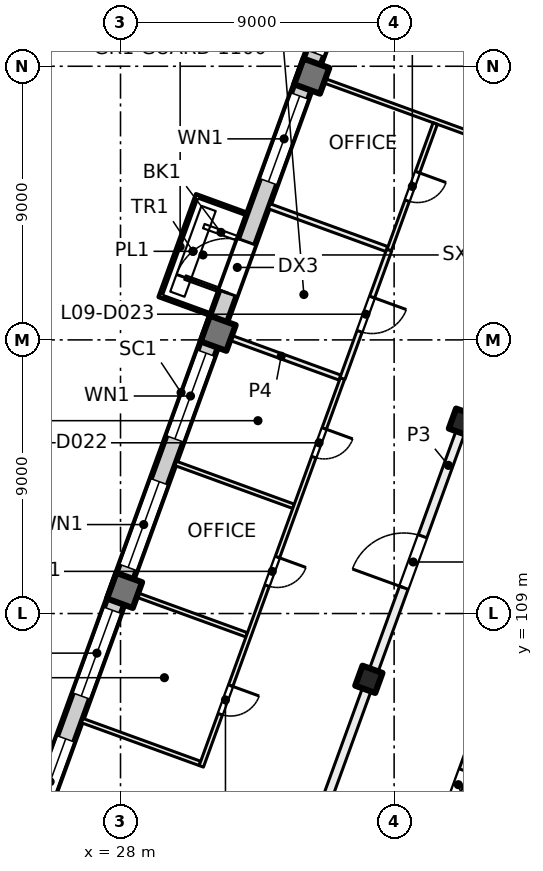
"""IFC4 building model, lengths in metres.
Left out: names, types, materials, properties, quantities, classifications, styles, units other than length and angle.
Written with IfcOpenShell. Run it as: python <this file> out.ifc"""

import sys

from ifc_helpers import new_model, si_unit, direction, frame, frame_2d, origin, origin_2d, place, context, subcontext, project, spatial, rectangle, extrude, element, fill, save


model = new_model("IFC4")
c1 = context("Model", 3, precision=1e-05, world=origin(), true_north=direction((0.0, 1.0)))
c2 = subcontext(c1, "Body", "Model", "MODEL_VIEW")
j1 = project(units=[si_unit("LENGTHUNIT", "METRE"), si_unit("PLANEANGLEUNIT", "RADIAN")], contexts=[c1])
p1 = place(None, origin())
s1 = spatial("IfcSite", under=j1, at=p1, CompositionType="ELEMENT")
p2 = place(p1, origin())
s2 = spatial("IfcBuilding", under=s1, at=p2, CompositionType="ELEMENT")
p3 = place(p2, frame((0.0, 0.0, 43.5)))
s3 = spatial("IfcBuildingStorey", under=s2, at=p3, CompositionType="ELEMENT", Elevation=43.5)
for number, where, z_axis, x_axis in (
    (1, (39.247, 115.293, 0.0), (0.0, 0.0, 1.0), (-0.342, -0.94, 0.0)),
    (2, (36.169, 106.836, 0.0), (0.0, 0.0, 1.0), (-0.342, -0.94, 0.0)),
):
    element("IfcColumn", number, at=place(p3, frame(where, z_axis=z_axis, x_axis=x_axis)), inside=s3, PredefinedType="COLUMN", context=c2, shape_type="SweptSolid", body=[
        extrude(rectangle(XDim=0.7, YDim=0.7, at=origin_2d()), origin(), (0.0, 0.0, 1.0), 4.0),
    ])
for number, where, z_axis, x_axis in (
    (3, (34.291, 126.675, 0.0), (0.0, 0.0, 1.0), (-0.342, -0.94, 0.0)),
    (4, (31.212, 118.218, 0.0), (0.0, 0.0, 1.0), (-0.342, -0.94, 0.0)),
    (5, (28.134, 109.76, 0.0), (0.0, 0.0, 1.0), (-0.342, -0.94, 0.0)),
):
    element("IfcColumn", number, at=place(p3, frame(where, z_axis=z_axis, x_axis=x_axis)), inside=s3, PredefinedType="COLUMN", context=c2, shape_type="SweptSolid", body=[
        extrude(rectangle(XDim=0.9, YDim=0.9, at=origin_2d()), origin(), (0.0, 0.0, 1.0), 4.0),
    ])
p4 = place(p3, frame((24.666, 100.669, 0.0), z_axis=(0.0, 0.0, 1.0), x_axis=(0.34201964167, 0.939692803373, 0.0)))
e6 = element("IfcWall", 6, at=p4, inside=s3, PredefinedType="SOLIDWALL", context=c2, shape_type="SweptSolid", body=[
    extrude(rectangle(XDim=32.884, YDim=0.6, at=frame_2d((16.442, 0.0))), origin(), (0.0, 0.0, 1.0), 3.625),
])
p5 = place(p4, frame((1.48, 0.0, 0.9)))
e7 = element("IfcOpeningElement", 7, at=p5, cuts=e6, PredefinedType="OPENING", context=c2, shape_type="SweptSolid", body=[
    extrude(rectangle(XDim=3.0, YDim=2.4, at=frame_2d((1.5, 1.2))), frame((0.0, 0.31, 0.0), z_axis=(0.0, -1.0, 0.0), x_axis=(1.0, 0.0, 0.0)), (0.0, 0.0, 1.0), 0.62),
])
p6 = place(p4, frame((5.98, 0.0, 0.9)))
e8 = element("IfcOpeningElement", 8, at=p6, cuts=e6, PredefinedType="OPENING", context=c2, shape_type="SweptSolid", body=[
    extrude(rectangle(XDim=3.0, YDim=2.4, at=frame_2d((1.5, 1.2))), frame((0.0, 0.31, 0.0), z_axis=(0.0, -1.0, 0.0), x_axis=(1.0, 0.0, 0.0)), (0.0, 0.0, 1.0), 0.62),
])
p7 = place(p4, frame((10.48, 0.0, 0.9)))
e9 = element("IfcOpeningElement", 9, at=p7, cuts=e6, PredefinedType="OPENING", context=c2, shape_type="SweptSolid", body=[
    extrude(rectangle(XDim=3.0, YDim=2.4, at=frame_2d((1.5, 1.2))), frame((0.0, 0.31, 0.0), z_axis=(0.0, -1.0, 0.0), x_axis=(1.0, 0.0, 0.0)), (0.0, 0.0, 1.0), 0.62),
])
p8 = place(p4, frame((14.98, 0.0, 0.9)))
e10 = element("IfcOpeningElement", 10, at=p8, cuts=e6, PredefinedType="OPENING", context=c2, shape_type="SweptSolid", body=[
    extrude(rectangle(XDim=3.0, YDim=2.4, at=frame_2d((1.5, 1.2))), frame((0.0, 0.31, 0.0), z_axis=(0.0, -1.0, 0.0), x_axis=(1.0, 0.0, 0.0)), (0.0, 0.0, 1.0), 0.62),
])
p9 = place(p4, frame((20.08, 0.0, 0.0)))
e11 = element("IfcOpeningElement", 11, at=p9, cuts=e6, PredefinedType="OPENING", context=c2, shape_type="SweptSolid", body=[
    extrude(rectangle(XDim=1.8, YDim=2.4, at=frame_2d((0.9, 1.2))), frame((0.0, 0.31, 0.0), z_axis=(0.0, -1.0, 0.0), x_axis=(1.0, 0.0, 0.0)), (0.0, 0.0, 1.0), 0.62),
])
p10 = place(p4, frame((23.98, 0.0, 0.9)))
e12 = element("IfcOpeningElement", 12, at=p10, cuts=e6, PredefinedType="OPENING", context=c2, shape_type="SweptSolid", body=[
    extrude(rectangle(XDim=3.0, YDim=2.4, at=frame_2d((1.5, 1.2))), frame((0.0, 0.31, 0.0), z_axis=(0.0, -1.0, 0.0), x_axis=(1.0, 0.0, 0.0)), (0.0, 0.0, 1.0), 0.62),
])
p11 = place(p4, frame((28.48, 0.0, 0.9)))
e13 = element("IfcOpeningElement", 13, at=p11, cuts=e6, PredefinedType="OPENING", context=c2, shape_type="SweptSolid", body=[
    extrude(rectangle(XDim=3.0, YDim=2.4, at=frame_2d((1.5, 1.2))), frame((0.0, 0.31, 0.0), z_axis=(0.0, -1.0, 0.0), x_axis=(1.0, 0.0, 0.0)), (0.0, 0.0, 1.0), 0.62),
])
p12 = place(p3, frame((26.736, 105.48, 0.0), z_axis=(0.0, 0.0, 1.0), x_axis=(0.939784783713, -0.341766821533, 0.0)))
e14 = element("IfcWall", 14, at=p12, inside=s3, PredefinedType="PARTITIONING", context=c2, shape_type="SweptSolid", body=[
    extrude(rectangle(XDim=4.125, YDim=0.15, at=frame_2d((2.062, 0.0))), origin(), (0.0, 0.0, 1.0), 3.625),
])
p13 = place(p3, frame((28.275, 109.709, 0.0), z_axis=(0.0, 0.0, 1.0), x_axis=(0.939791695678, -0.341747814529, 0.0)))
e15 = element("IfcWall", 15, at=p13, inside=s3, PredefinedType="PARTITIONING", context=c2, shape_type="SweptSolid", body=[
    extrude(rectangle(XDim=4.125, YDim=0.15, at=frame_2d((2.063, 0.0))), origin(), (0.0, 0.0, 1.0), 3.625),
])
p14 = place(p3, frame((29.814, 113.938, 0.0), z_axis=(0.0, 0.0, 1.0), x_axis=(0.93970873465, -0.341975867603, 0.0)))
e16 = element("IfcWall", 16, at=p14, inside=s3, PredefinedType="PARTITIONING", context=c2, shape_type="SweptSolid", body=[
    extrude(rectangle(XDim=4.126, YDim=0.15, at=frame_2d((2.063, 0.0))), origin(), (0.0, 0.0, 1.0), 3.625),
])
p15 = place(p3, frame((35.3, 116.73, 0.0), z_axis=(0.0, 0.0, 1.0), x_axis=(-0.342040522051, -0.939685203286, 0.0)))
e17 = element("IfcWall", 17, at=p15, inside=s3, PredefinedType="PARTITIONING", context=c2, shape_type="SweptSolid", body=[
    extrude(rectangle(XDim=13.575, YDim=0.15, at=frame_2d((6.787, 0.0))), origin(), (0.0, 0.0, 1.0), 3.625),
])
p16 = place(p15, frame((10.75, 0.0, 0.0)))
e18 = element("IfcOpeningElement", 18, at=p16, cuts=e17, PredefinedType="OPENING", context=c2, shape_type="SweptSolid", body=[
    extrude(rectangle(XDim=1.0, YDim=2.1, at=frame_2d((0.5, 1.05))), frame((0.0, 0.085, 0.0), z_axis=(0.0, -1.0, 0.0), x_axis=(1.0, 0.0, 0.0)), (0.0, 0.0, 1.0), 0.17),
])
p17 = place(p15, frame((6.25, 0.0, 0.0)))
e19 = element("IfcOpeningElement", 19, at=p17, cuts=e17, PredefinedType="OPENING", context=c2, shape_type="SweptSolid", body=[
    extrude(rectangle(XDim=1.0, YDim=2.1, at=frame_2d((0.5, 1.05))), frame((0.0, 0.085, 0.0), z_axis=(0.0, -1.0, 0.0), x_axis=(1.0, 0.0, 0.0)), (0.0, 0.0, 1.0), 0.17),
])
p18 = place(p15, frame((1.75, 0.0, 0.0)))
e20 = element("IfcOpeningElement", 20, at=p18, cuts=e17, PredefinedType="OPENING", context=c2, shape_type="SweptSolid", body=[
    extrude(rectangle(XDim=1.0, YDim=2.1, at=frame_2d((0.5, 1.05))), frame((0.0, 0.085, 0.0), z_axis=(0.0, -1.0, 0.0), x_axis=(1.0, 0.0, 0.0)), (0.0, 0.0, 1.0), 0.17),
])
p19 = place(p3, frame((31.353, 118.166, 0.0), z_axis=(0.0, 0.0, 1.0), x_axis=(0.939750086456, -0.341862216405, 0.0)))
e21 = element("IfcWall", 21, at=p19, inside=s3, PredefinedType="PARTITIONING", context=c2, shape_type="SweptSolid", body=[
    extrude(rectangle(XDim=4.113, YDim=0.175, at=frame_2d((2.056, 0.0))), origin(), (0.0, 0.0, 1.0), 3.625),
])
p20 = place(p3, frame((32.881, 97.657, 0.0), z_axis=(0.0, 0.0, 1.0), x_axis=(0.342017360004, 0.939693633828, 0.0)))
e22 = element("IfcWall", 22, at=p20, inside=s3, PredefinedType="PARTITIONING", context=c2, shape_type="SweptSolid", body=[
    extrude(rectangle(XDim=34.516, YDim=0.3, at=frame_2d((17.258, 0.0))), origin(), (0.0, 0.0, 1.0), 3.625),
])
p21 = place(p20, frame((12.975, 0.0, 0.0)))
e23 = element("IfcOpeningElement", 23, at=p21, cuts=e22, PredefinedType="OPENING", context=c2, shape_type="SweptSolid", body=[
    extrude(rectangle(XDim=1.8, YDim=2.1, at=frame_2d((0.9, 1.05))), frame((0.0, 0.16, 0.0), z_axis=(0.0, -1.0, 0.0), x_axis=(1.0, 0.0, 0.0)), (0.0, 0.0, 1.0), 0.32),
])
p22 = place(p3, frame((34.431, 126.624, 0.0), z_axis=(0.0, 0.0, 1.0), x_axis=(0.939687752599, -0.342033518263, 0.0)))
e24 = element("IfcWall", 24, at=p22, inside=s3, PredefinedType="PARTITIONING", context=c2, shape_type="SweptSolid", body=[
    extrude(rectangle(XDim=8.301, YDim=0.15, at=frame_2d((4.15, 0.0))), origin(), (0.0, 0.0, 1.0), 3.625),
])
p23 = place(p3, frame((36.839, 120.959, 0.0), z_axis=(0.0, 0.0, 1.0), x_axis=(-0.341986974999, -0.939704692407, 0.0)))
e25 = element("IfcWall", 25, at=p23, inside=s3, PredefinedType="PARTITIONING", context=c2, shape_type="SweptSolid", body=[
    extrude(rectangle(XDim=4.5, YDim=0.175, at=frame_2d((2.25, 0.0))), origin(), (0.0, 0.0, 1.0), 3.625),
])
p24 = place(p23, frame((1.65, 0.0, 0.0)))
e26 = element("IfcOpeningElement", 26, at=p24, cuts=e25, PredefinedType="OPENING", context=c2, shape_type="SweptSolid", body=[
    extrude(rectangle(XDim=1.2, YDim=2.1, at=frame_2d((0.6, 1.05))), frame((0.0, 0.097, 0.0), z_axis=(0.0, -1.0, 0.0), x_axis=(1.0, 0.0, 0.0)), (0.0, 0.0, 1.0), 0.195),
])
p25 = place(p3, frame((36.757, 120.989, 0.0), z_axis=(0.0, 0.0, 1.0), x_axis=(-0.939750086456, 0.341862216405, 0.0)))
e27 = element("IfcWall", 27, at=p25, inside=s3, PredefinedType="PARTITIONING", context=c2, shape_type="SweptSolid", body=[
    extrude(rectangle(XDim=4.113, YDim=0.175, at=frame_2d((2.056, 0.0))), origin(), (0.0, 0.0, 1.0), 3.625),
])
p26 = place(p3, frame((38.352, 125.117, 0.0), z_axis=(0.0, 0.0, 1.0), x_axis=(-0.34193355862, -0.939724130524, 0.0)))
e28 = element("IfcWall", 28, at=p26, inside=s3, PredefinedType="PARTITIONING", context=c2, shape_type="SweptSolid", body=[
    extrude(rectangle(XDim=4.425, YDim=0.15, at=frame_2d((2.212, 0.0))), origin(), (0.0, 0.0, 1.0), 3.625),
])
p27 = place(p26, frame((1.702, 0.0, 0.0)))
e29 = element("IfcOpeningElement", 29, at=p27, cuts=e28, PredefinedType="OPENING", context=c2, shape_type="SweptSolid", body=[
    extrude(rectangle(XDim=1.0, YDim=2.1, at=frame_2d((0.5, 1.05))), frame((0.0, 0.085, 0.0), z_axis=(0.0, -1.0, 0.0), x_axis=(1.0, 0.0, 0.0)), (0.0, 0.0, 1.0), 0.17),
])
p28 = place(p3, frame((47.314, 125.909, 0.0), z_axis=(0.0, 0.0, 1.0), x_axis=(-0.342010770371, -0.939696032209, 0.0)))
e30 = element("IfcWall", 30, at=p28, inside=s3, PredefinedType="PARTITIONING", context=c2, shape_type="SweptSolid", body=[
    extrude(rectangle(XDim=31.485, YDim=0.3, at=frame_2d((15.742, 0.0))), origin(), (0.0, 0.0, 1.0), 3.625),
])
p29 = place(p28, frame((28.259, 0.0, 0.0)))
e31 = element("IfcOpeningElement", 31, at=p29, cuts=e30, PredefinedType="OPENING", context=c2, shape_type="SweptSolid", body=[
    extrude(rectangle(XDim=1.2, YDim=2.1, at=frame_2d((0.6, 1.05))), frame((0.0, 0.16, 0.0), z_axis=(0.0, -1.0, 0.0), x_axis=(1.0, 0.0, 0.0)), (0.0, 0.0, 1.0), 0.32),
])
p30 = place(p28, frame((23.484, 0.0, 0.0)))
e32 = element("IfcOpeningElement", 32, at=p30, cuts=e30, PredefinedType="OPENING", context=c2, shape_type="SweptSolid", body=[
    extrude(rectangle(XDim=1.0, YDim=2.1, at=frame_2d((0.5, 1.05))), frame((0.0, 0.16, 0.0), z_axis=(0.0, -1.0, 0.0), x_axis=(1.0, 0.0, 0.0)), (0.0, 0.0, 1.0), 0.32),
])
p31 = place(p28, frame((18.984, 0.0, 0.0)))
e33 = element("IfcOpeningElement", 33, at=p31, cuts=e30, PredefinedType="OPENING", context=c2, shape_type="SweptSolid", body=[
    extrude(rectangle(XDim=1.0, YDim=2.1, at=frame_2d((0.5, 1.05))), frame((0.0, 0.16, 0.0), z_axis=(0.0, -1.0, 0.0), x_axis=(1.0, 0.0, 0.0)), (0.0, 0.0, 1.0), 0.32),
])
p32 = place(p28, frame((14.385, 0.0, 0.0)))
e34 = element("IfcOpeningElement", 34, at=p32, cuts=e30, PredefinedType="OPENING", context=c2, shape_type="SweptSolid", body=[
    extrude(rectangle(XDim=1.2, YDim=2.1, at=frame_2d((0.6, 1.05))), frame((0.0, 0.16, 0.0), z_axis=(0.0, -1.0, 0.0), x_axis=(1.0, 0.0, 0.0)), (0.0, 0.0, 1.0), 0.32),
])
p33 = place(p28, frame((9.885, 0.0, 0.0)))
e35 = element("IfcOpeningElement", 35, at=p33, cuts=e30, PredefinedType="OPENING", context=c2, shape_type="SweptSolid", body=[
    extrude(rectangle(XDim=1.2, YDim=2.1, at=frame_2d((0.6, 1.05))), frame((0.0, 0.16, 0.0), z_axis=(0.0, -1.0, 0.0), x_axis=(1.0, 0.0, 0.0)), (0.0, 0.0, 1.0), 0.32),
])
p34 = place(p28, frame((5.384, 0.0, 0.0)))
e36 = element("IfcOpeningElement", 36, at=p34, cuts=e30, PredefinedType="OPENING", context=c2, shape_type="SweptSolid", body=[
    extrude(rectangle(XDim=1.2, YDim=2.1, at=frame_2d((0.6, 1.05))), frame((0.0, 0.16, 0.0), z_axis=(0.0, -1.0, 0.0), x_axis=(1.0, 0.0, 0.0)), (0.0, 0.0, 1.0), 0.32),
])
p35 = place(p5, origin())
e37 = element("IfcWindow", 37, at=p35, inside=s3, PartitioningType="SINGLE_PANEL", PredefinedType="WINDOW", context=c2, shape_type="SweptSolid", body=[
    extrude(rectangle(XDim=3.0, YDim=2.4, at=frame_2d((1.5, 1.2))), frame((0.0, 0.03, 0.0), z_axis=(0.0, -1.0, 0.0), x_axis=(1.0, 0.0, 0.0)), (0.0, 0.0, 1.0), 0.06),
])
fill(e7, e37)
p36 = place(p6, origin())
e38 = element("IfcWindow", 38, at=p36, inside=s3, PartitioningType="SINGLE_PANEL", PredefinedType="WINDOW", context=c2, shape_type="SweptSolid", body=[
    extrude(rectangle(XDim=3.0, YDim=2.4, at=frame_2d((1.5, 1.2))), frame((0.0, 0.03, 0.0), z_axis=(0.0, -1.0, 0.0), x_axis=(1.0, 0.0, 0.0)), (0.0, 0.0, 1.0), 0.06),
])
fill(e8, e38)
p37 = place(p7, origin())
e39 = element("IfcWindow", 39, at=p37, inside=s3, PartitioningType="SINGLE_PANEL", PredefinedType="WINDOW", context=c2, shape_type="SweptSolid", body=[
    extrude(rectangle(XDim=3.0, YDim=2.4, at=frame_2d((1.5, 1.2))), frame((0.0, 0.03, 0.0), z_axis=(0.0, -1.0, 0.0), x_axis=(1.0, 0.0, 0.0)), (0.0, 0.0, 1.0), 0.06),
])
fill(e9, e39)
p38 = place(p8, origin())
e40 = element("IfcWindow", 40, at=p38, inside=s3, PartitioningType="SINGLE_PANEL", PredefinedType="WINDOW", context=c2, shape_type="SweptSolid", body=[
    extrude(rectangle(XDim=3.0, YDim=2.4, at=frame_2d((1.5, 1.2))), frame((0.0, 0.03, 0.0), z_axis=(0.0, -1.0, 0.0), x_axis=(1.0, 0.0, 0.0)), (0.0, 0.0, 1.0), 0.06),
])
fill(e10, e40)
p39 = place(p9, origin())
e41 = element("IfcDoor", 41, at=p39, inside=s3, OperationType="DOUBLE_DOOR_SINGLE_SWING", PredefinedType="DOOR", context=c2, shape_type="SweptSolid", body=[
    extrude(rectangle(XDim=1.8, YDim=2.4, at=frame_2d((0.9, 1.2))), frame((0.0, 0.025, 0.0), z_axis=(0.0, -1.0, 0.0), x_axis=(1.0, 0.0, 0.0)), (0.0, 0.0, 1.0), 0.05),
])
fill(e11, e41)
p40 = place(p10, origin())
e42 = element("IfcWindow", 42, at=p40, inside=s3, PartitioningType="SINGLE_PANEL", PredefinedType="WINDOW", context=c2, shape_type="SweptSolid", body=[
    extrude(rectangle(XDim=3.0, YDim=2.4, at=frame_2d((1.5, 1.2))), frame((0.0, 0.03, 0.0), z_axis=(0.0, -1.0, 0.0), x_axis=(1.0, 0.0, 0.0)), (0.0, 0.0, 1.0), 0.06),
])
fill(e12, e42)
p41 = place(p11, origin())
e43 = element("IfcWindow", 43, at=p41, inside=s3, PartitioningType="SINGLE_PANEL", PredefinedType="WINDOW", context=c2, shape_type="SweptSolid", body=[
    extrude(rectangle(XDim=3.0, YDim=2.4, at=frame_2d((1.5, 1.2))), frame((0.0, 0.03, 0.0), z_axis=(0.0, -1.0, 0.0), x_axis=(1.0, 0.0, 0.0)), (0.0, 0.0, 1.0), 0.06),
])
fill(e13, e43)
p42 = place(p16, origin())
e44 = element("IfcDoor", 44, at=p42, inside=s3, OperationType="SINGLE_SWING_LEFT", PredefinedType="DOOR", context=c2, shape_type="SweptSolid", body=[
    extrude(rectangle(XDim=1.0, YDim=2.1, at=frame_2d((0.5, 1.05))), frame((0.0, 0.025, 0.0), z_axis=(0.0, -1.0, 0.0), x_axis=(1.0, 0.0, 0.0)), (0.0, 0.0, 1.0), 0.05),
])
fill(e18, e44)
p43 = place(p17, origin())
e45 = element("IfcDoor", 45, at=p43, inside=s3, OperationType="SINGLE_SWING_LEFT", PredefinedType="DOOR", context=c2, shape_type="SweptSolid", body=[
    extrude(rectangle(XDim=1.0, YDim=2.1, at=frame_2d((0.5, 1.05))), frame((0.0, 0.025, 0.0), z_axis=(0.0, -1.0, 0.0), x_axis=(1.0, 0.0, 0.0)), (0.0, 0.0, 1.0), 0.05),
])
fill(e19, e45)
p44 = place(p18, origin())
e46 = element("IfcDoor", 46, at=p44, inside=s3, OperationType="SINGLE_SWING_LEFT", PredefinedType="DOOR", context=c2, shape_type="SweptSolid", body=[
    extrude(rectangle(XDim=1.0, YDim=2.1, at=frame_2d((0.5, 1.05))), frame((0.0, 0.025, 0.0), z_axis=(0.0, -1.0, 0.0), x_axis=(1.0, 0.0, 0.0)), (0.0, 0.0, 1.0), 0.05),
])
fill(e20, e46)
p45 = place(p24, origin())
e47 = element("IfcDoor", 47, at=p45, inside=s3, OperationType="DOUBLE_DOOR_SINGLE_SWING", PredefinedType="DOOR", context=c2, shape_type="SweptSolid", body=[
    extrude(rectangle(XDim=1.2, YDim=2.1, at=frame_2d((0.6, 1.05))), frame((0.0, 0.025, 0.0), z_axis=(0.0, -1.0, 0.0), x_axis=(1.0, 0.0, 0.0)), (0.0, 0.0, 1.0), 0.05),
])
fill(e26, e47)
p46 = place(p27, origin())
e48 = element("IfcDoor", 48, at=p46, inside=s3, OperationType="SINGLE_SWING_RIGHT", PredefinedType="DOOR", context=c2, shape_type="SweptSolid", body=[
    extrude(rectangle(XDim=1.0, YDim=2.1, at=frame_2d((0.5, 1.05))), frame((0.0, 0.025, 0.0), z_axis=(0.0, -1.0, 0.0), x_axis=(1.0, 0.0, 0.0)), (0.0, 0.0, 1.0), 0.05),
])
fill(e29, e48)
p47 = place(p21, origin())
e49 = element("IfcDoor", 49, at=p47, inside=s3, OperationType="DOUBLE_DOOR_SINGLE_SWING", PredefinedType="DOOR", context=c2, shape_type="SweptSolid", body=[
    extrude(rectangle(XDim=1.8, YDim=2.1, at=frame_2d((0.9, 1.05))), frame((0.0, 0.025, 0.0), z_axis=(0.0, -1.0, 0.0), x_axis=(1.0, 0.0, 0.0)), (0.0, 0.0, 1.0), 0.05),
])
fill(e23, e49)
p48 = place(p30, origin())
e50 = element("IfcDoor", 50, at=p48, inside=s3, OperationType="SINGLE_SWING_LEFT", PredefinedType="DOOR", context=c2, shape_type="SweptSolid", body=[
    extrude(rectangle(XDim=1.0, YDim=2.1, at=frame_2d((0.5, 1.05))), frame((0.0, 0.025, 0.0), z_axis=(0.0, -1.0, 0.0), x_axis=(1.0, 0.0, 0.0)), (0.0, 0.0, 1.0), 0.05),
])
fill(e32, e50)
save(model, sys.argv[1])
